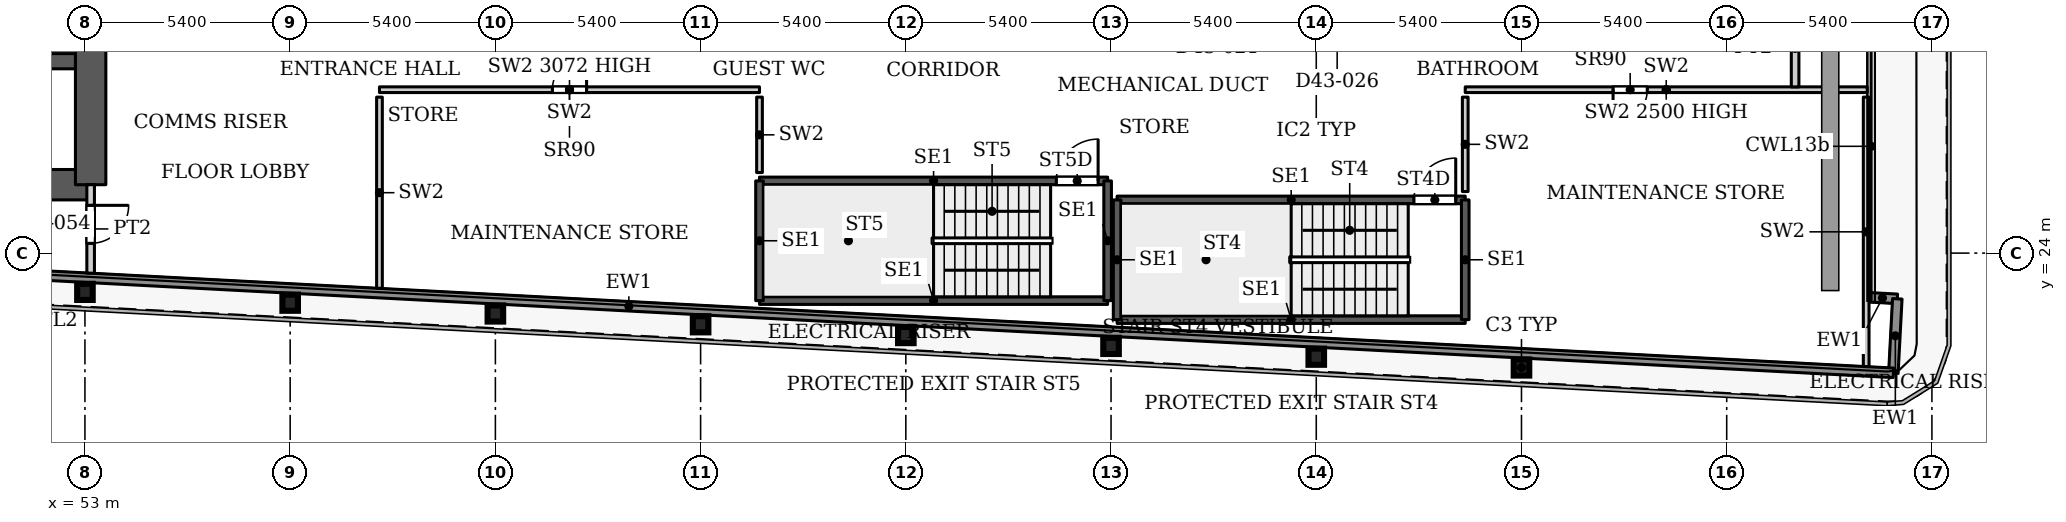
"""IFC4 building model, lengths in metres.
Left out: names, types, materials, properties, quantities, classifications, styles, units other than length and angle.
Written with IfcOpenShell. Run it as: python <this file> out.ifc"""

import sys

from ifc_helpers import new_model, si_unit, direction, frame, frame_2d, origin, origin_2d, place, context, subcontext, project, spatial, rectangle, i_section, extrude, source, transform, mapped, element, fill, save


model = new_model("IFC4")
c1 = context("Model", 3, precision=1e-05, world=origin(), true_north=direction((0.0, 1.0)))
c2 = subcontext(c1, "Body", "Model", "MODEL_VIEW")
j1 = project(units=[si_unit("LENGTHUNIT", "METRE"), si_unit("PLANEANGLEUNIT", "RADIAN")], contexts=[c1])
p1 = place(None, origin())
s1 = spatial("IfcSite", under=j1, at=p1, CompositionType="ELEMENT")
p2 = place(p1, origin())
s2 = spatial("IfcBuilding", under=s1, at=p2, CompositionType="ELEMENT")
p3 = place(p2, frame((0.0, 0.0, 191.6)))
s3 = spatial("IfcBuildingStorey", under=s2, at=p3, CompositionType="ELEMENT", Elevation=191.6)
for number, where, z_axis, x_axis in (
    (1, (90.8, 20.99, 0.0), (0.0, 0.0, 1.0), (1.0, 0.0, 0.0)),
    (2, (85.4, 21.274, 0.0), (0.0, 0.0, 1.0), (1.0, 0.0, 0.0)),
    (3, (80.0, 21.558, 0.0), (0.0, 0.0, 1.0), (1.0, 0.0, 0.0)),
    (4, (74.6, 21.843, 0.0), (0.0, 0.0, 1.0), (1.0, 0.0, 0.0)),
    (5, (69.2, 22.127, 0.0), (0.0, 0.0, 1.0), (1.0, 0.0, 0.0)),
    (6, (63.8, 22.411, 0.0), (0.0, 0.0, 1.0), (1.0, 0.0, 0.0)),
    (7, (58.4, 22.695, 0.0), (0.0, 0.0, 1.0), (1.0, 0.0, 0.0)),
    (8, (53.0, 22.98, 0.0), (0.0, 0.0, 1.0), (1.0, 0.0, 0.0)),
):
    element("IfcColumn", number, at=place(p3, frame(where, z_axis=z_axis, x_axis=x_axis)), inside=s3, PredefinedType="COLUMN", context=c2, shape_type="SweptSolid", body=[
        extrude(i_section(OverallWidth=0.409, OverallDepth=0.425, WebThickness=0.033, FlangeThickness=0.052, FilletRadius=0.013, at=origin_2d()), origin(), (0.0, 0.0, 1.0), 3.9),
    ])
p4 = place(p3, frame((34.75, 25.8, 0.0), z_axis=(0.0, 0.0, 1.0), x_axis=(1.0, 0.0, 0.0)))
e9 = element("IfcWall", 9, at=p4, inside=s3, PredefinedType="SHEAR", context=c2, shape_type="SweptSolid", body=[
    extrude(rectangle(XDim=18.4, YDim=0.8, at=frame_2d((9.2, 0.0))), origin(), (0.0, 0.0, 1.0), 3.9),
])
p5 = place(p3, frame((34.75, 29.05, 0.0), z_axis=(0.0, 0.0, 1.0), x_axis=(1.0, 0.0, 0.0)))
e10 = element("IfcWall", 10, at=p5, inside=s3, PredefinedType="SHEAR", context=c2, shape_type="SweptSolid", body=[
    extrude(rectangle(XDim=18.4, YDim=0.4, at=frame_2d((9.2, 0.0))), origin(), (0.0, 0.0, 1.0), 3.9),
])
p6 = place(p5, frame((0.875, 0.0, 0.0)))
e11 = element("IfcOpeningElement", 11, at=p6, cuts=e10, PredefinedType="OPENING", context=c2, shape_type="SweptSolid", body=[
    extrude(rectangle(XDim=1.1, YDim=2.2, at=frame_2d((0.55, 1.1))), frame((0.0, 0.21, 0.0), z_axis=(0.0, -1.0, 0.0), x_axis=(1.0, 0.0, 0.0)), (0.0, 0.0, 1.0), 0.42),
])
p7 = place(p5, frame((3.725, 0.0, 0.0)))
e12 = element("IfcOpeningElement", 12, at=p7, cuts=e10, PredefinedType="OPENING", context=c2, shape_type="SweptSolid", body=[
    extrude(rectangle(XDim=1.1, YDim=2.2, at=frame_2d((0.55, 1.1))), frame((0.0, 0.21, 0.0), z_axis=(0.0, -1.0, 0.0), x_axis=(1.0, 0.0, 0.0)), (0.0, 0.0, 1.0), 0.42),
])
p8 = place(p5, frame((6.575, 0.0, 0.0)))
e13 = element("IfcOpeningElement", 13, at=p8, cuts=e10, PredefinedType="OPENING", context=c2, shape_type="SweptSolid", body=[
    extrude(rectangle(XDim=1.1, YDim=2.2, at=frame_2d((0.55, 1.1))), frame((0.0, 0.21, 0.0), z_axis=(0.0, -1.0, 0.0), x_axis=(1.0, 0.0, 0.0)), (0.0, 0.0, 1.0), 0.42),
])
p9 = place(p5, frame((9.425, 0.0, 0.0)))
e14 = element("IfcOpeningElement", 14, at=p9, cuts=e10, PredefinedType="OPENING", context=c2, shape_type="SweptSolid", body=[
    extrude(rectangle(XDim=1.1, YDim=2.2, at=frame_2d((0.55, 1.1))), frame((0.0, 0.21, 0.0), z_axis=(0.0, -1.0, 0.0), x_axis=(1.0, 0.0, 0.0)), (0.0, 0.0, 1.0), 0.42),
])
p10 = place(p5, frame((12.275, 0.0, 0.0)))
e15 = element("IfcOpeningElement", 15, at=p10, cuts=e10, PredefinedType="OPENING", context=c2, shape_type="SweptSolid", body=[
    extrude(rectangle(XDim=1.1, YDim=2.2, at=frame_2d((0.55, 1.1))), frame((0.0, 0.21, 0.0), z_axis=(0.0, -1.0, 0.0), x_axis=(1.0, 0.0, 0.0)), (0.0, 0.0, 1.0), 0.42),
])
p11 = place(p5, frame((15.125, 0.0, 0.0)))
e16 = element("IfcOpeningElement", 16, at=p11, cuts=e10, PredefinedType="OPENING", context=c2, shape_type="SweptSolid", body=[
    extrude(rectangle(XDim=1.1, YDim=2.2, at=frame_2d((0.55, 1.1))), frame((0.0, 0.21, 0.0), z_axis=(0.0, -1.0, 0.0), x_axis=(1.0, 0.0, 0.0)), (0.0, 0.0, 1.0), 0.42),
])
p12 = place(p3, frame((53.15, 25.8, 0.0), z_axis=(0.0, 0.0, 1.0), x_axis=(0.0, 1.0, 0.0)))
e17 = element("IfcWall", 17, at=p12, inside=s3, PredefinedType="SHEAR", context=c2, shape_type="SweptSolid", body=[
    extrude(rectangle(XDim=10.4, YDim=0.8, at=frame_2d((5.2, 0.0))), origin(), (0.0, 0.0, 1.0), 3.9),
])
p13 = place(p3, frame((99.907, 22.839, 0.0), z_axis=(0.0, 0.0, 1.0), x_axis=(0.998561284263, -0.053622398031, 0.0)))
e18 = element("IfcWall", 18, at=p13, inside=s3, PredefinedType="SOLIDWALL", context=c2, shape_type="SweptSolid", body=[
    extrude(rectangle(XDim=0.783, YDim=0.25, at=frame_2d((0.392, 0.0))), origin(), (0.0, 0.0, 1.0), 3.75),
])
p14 = place(p3, frame((100.689, 22.797, 0.0), z_axis=(0.0, 0.0, 1.0), x_axis=(-0.052841433274, -0.998602915542, 0.0)))
e19 = element("IfcWall", 19, at=p14, inside=s3, PredefinedType="SOLIDWALL", context=c2, shape_type="SweptSolid", body=[
    extrude(rectangle(XDim=1.95, YDim=0.25, at=frame_2d((0.975, 0.0))), origin(), (0.0, 0.0, 1.0), 3.75),
])
p15 = place(p3, frame((100.586, 20.85, 0.0), z_axis=(0.0, 0.0, 1.0), x_axis=(-0.99861746497, 0.052565755559, 0.0)))
e20 = element("IfcWall", 20, at=p15, inside=s3, PredefinedType="SOLIDWALL", context=c2, shape_type="SweptSolid", body=[
    extrude(rectangle(XDim=66.639, YDim=0.25, at=frame_2d((33.319, 0.0))), origin(), (0.0, 0.0, 1.0), 3.75),
])
p16 = place(p3, frame((80.16, 22.25, 0.0), z_axis=(0.0, 0.0, 1.0), x_axis=(1.0, 0.0, 0.0)))
e21 = element("IfcWall", 21, at=p16, inside=s3, PredefinedType="SHEAR", context=c2, shape_type="SweptSolid", body=[
    extrude(rectangle(XDim=9.16, YDim=0.2, at=frame_2d((4.58, 0.0))), origin(), (0.0, 0.0, 1.0), 3.9),
])
p17 = place(p3, frame((80.16, 25.4, 0.0), z_axis=(0.0, 0.0, 1.0), x_axis=(1.0, 0.0, 0.0)))
e22 = element("IfcWall", 22, at=p17, inside=s3, PredefinedType="SHEAR", context=c2, shape_type="SweptSolid", body=[
    extrude(rectangle(XDim=9.16, YDim=0.2, at=frame_2d((4.58, 0.0))), origin(), (0.0, 0.0, 1.0), 3.9),
])
p18 = place(p17, frame((7.81, 0.0, 0.0)))
e23 = element("IfcOpeningElement", 23, at=p18, cuts=e22, PredefinedType="OPENING", context=c2, shape_type="SweptSolid", body=[
    extrude(rectangle(XDim=1.1, YDim=2.2, at=frame_2d((0.55, 1.1))), frame((0.0, 0.11, 0.0), z_axis=(0.0, -1.0, 0.0), x_axis=(1.0, 0.0, 0.0)), (0.0, 0.0, 1.0), 0.22),
])
for number, where, z_axis, x_axis in (
    (24, (80.16, 22.25, 0.0), (0.0, 0.0, 1.0), (0.0, 1.0, 0.0)),
    (25, (89.32, 22.25, 0.0), (0.0, 0.0, 1.0), (0.0, 1.0, 0.0)),
):
    element("IfcWall", number, at=place(p3, frame(where, z_axis=z_axis, x_axis=x_axis)), inside=s3, PredefinedType="SHEAR", context=c2, shape_type="SweptSolid", body=[
        extrude(rectangle(XDim=3.15, YDim=0.2, at=frame_2d((1.575, 0.0))), origin(), (0.0, 0.0, 1.0), 3.9),
    ])
p19 = place(p3, frame((70.75, 22.75, 0.0), z_axis=(0.0, 0.0, 1.0), x_axis=(1.0, 0.0, 0.0)))
e26 = element("IfcWall", 26, at=p19, inside=s3, PredefinedType="SHEAR", context=c2, shape_type="SweptSolid", body=[
    extrude(rectangle(XDim=9.16, YDim=0.2, at=frame_2d((4.58, 0.0))), origin(), (0.0, 0.0, 1.0), 3.9),
])
p20 = place(p3, frame((70.75, 25.9, 0.0), z_axis=(0.0, 0.0, 1.0), x_axis=(1.0, 0.0, 0.0)))
e27 = element("IfcWall", 27, at=p20, inside=s3, PredefinedType="SHEAR", context=c2, shape_type="SweptSolid", body=[
    extrude(rectangle(XDim=9.16, YDim=0.2, at=frame_2d((4.58, 0.0))), origin(), (0.0, 0.0, 1.0), 3.9),
])
p21 = place(p20, frame((7.81, 0.0, 0.0)))
e28 = element("IfcOpeningElement", 28, at=p21, cuts=e27, PredefinedType="OPENING", context=c2, shape_type="SweptSolid", body=[
    extrude(rectangle(XDim=1.1, YDim=2.2, at=frame_2d((0.55, 1.1))), frame((0.0, 0.11, 0.0), z_axis=(0.0, -1.0, 0.0), x_axis=(1.0, 0.0, 0.0)), (0.0, 0.0, 1.0), 0.22),
])
for number, where, z_axis, x_axis in (
    (29, (70.75, 22.75, 0.0), (0.0, 0.0, 1.0), (0.0, 1.0, 0.0)),
    (30, (79.91, 22.75, 0.0), (0.0, 0.0, 1.0), (0.0, 1.0, 0.0)),
):
    element("IfcWall", number, at=place(p3, frame(where, z_axis=z_axis, x_axis=x_axis)), inside=s3, PredefinedType="SHEAR", context=c2, shape_type="SweptSolid", body=[
        extrude(rectangle(XDim=3.15, YDim=0.2, at=frame_2d((1.575, 0.0))), origin(), (0.0, 0.0, 1.0), 3.9),
    ])
p22 = place(p3, frame((60.75, 28.3, 0.0), z_axis=(0.0, 0.0, 1.0), x_axis=(1.0, 0.0, 0.0)))
e31 = element("IfcWall", 31, at=p22, inside=s3, PredefinedType="PARTITIONING", context=c2, shape_type="SweptSolid", body=[
    extrude(rectangle(XDim=10.0, YDim=0.15, at=frame_2d((5.0, 0.0))), origin(), (0.0, 0.0, 1.0), 3.072),
])
p23 = place(p22, frame((4.55, 0.0, 0.0)))
e32 = element("IfcOpeningElement", 32, at=p23, cuts=e31, PredefinedType="OPENING", context=c2, shape_type="SweptSolid", body=[
    extrude(rectangle(XDim=0.9, YDim=2.2, at=frame_2d((0.45, 1.1))), frame((0.0, 0.085, 0.0), z_axis=(0.0, -1.0, 0.0), x_axis=(1.0, 0.0, 0.0)), (0.0, 0.0, 1.0), 0.17),
])
p24 = place(p3, frame((60.75, 23.075, 0.0), z_axis=(0.0, 0.0, 1.0), x_axis=(0.0, 1.0, 0.0)))
e33 = element("IfcWall", 33, at=p24, inside=s3, PredefinedType="PARTITIONING", context=c2, shape_type="SweptSolid", body=[
    extrude(rectangle(XDim=5.03, YDim=0.15, at=frame_2d((2.515, 0.0))), origin(), (0.0, 0.0, 1.0), 3.9),
])
p25 = place(p3, frame((70.75, 26.12, 0.0), z_axis=(0.0, 0.0, 1.0), x_axis=(0.0, 1.0, 0.0)))
e34 = element("IfcWall", 34, at=p25, inside=s3, PredefinedType="PARTITIONING", context=c2, shape_type="SweptSolid", body=[
    extrude(rectangle(XDim=1.985, YDim=0.15, at=frame_2d((0.992, 0.0))), origin(), (0.0, 0.0, 1.0), 3.9),
])
p26 = place(p3, frame((89.32, 28.3, 0.0), z_axis=(0.0, 0.0, 1.0), x_axis=(1.0, 0.0, 0.0)))
e35 = element("IfcWall", 35, at=p26, inside=s3, PredefinedType="PARTITIONING", context=c2, shape_type="SweptSolid", body=[
    extrude(rectangle(XDim=10.578, YDim=0.15, at=frame_2d((5.289, 0.0))), origin(), (0.0, 0.0, 1.0), 2.5),
])
p27 = place(p26, frame((3.89, 0.0, 0.0)))
e36 = element("IfcOpeningElement", 36, at=p27, cuts=e35, PredefinedType="OPENING", context=c2, shape_type="SweptSolid", body=[
    extrude(rectangle(XDim=0.9, YDim=2.2, at=frame_2d((0.45, 1.1))), frame((0.0, 0.085, 0.0), z_axis=(0.0, -1.0, 0.0), x_axis=(1.0, 0.0, 0.0)), (0.0, 0.0, 1.0), 0.17),
])
p28 = place(p3, frame((89.32, 25.62, 0.0), z_axis=(0.0, 0.0, 1.0), x_axis=(0.0, 1.0, 0.0)))
e37 = element("IfcWall", 37, at=p28, inside=s3, PredefinedType="PARTITIONING", context=c2, shape_type="SweptSolid", body=[
    extrude(rectangle(XDim=2.485, YDim=0.15, at=frame_2d((1.242, 0.0))), origin(), (0.0, 0.0, 1.0), 3.9),
])
p29 = place(p3, frame((99.87, 21.015, 0.0), z_axis=(0.0, 0.0, 1.0), x_axis=(0.0, 1.0, 0.0)))
e38 = element("IfcWall", 38, at=p29, inside=s3, PredefinedType="PARTITIONING", context=c2, shape_type="SweptSolid", body=[
    extrude(rectangle(XDim=7.09, YDim=0.15, at=frame_2d((3.545, 0.0))), origin(), (0.0, 0.0, 1.0), 3.9),
])
p30 = place(p3, frame((53.15, 23.472, 0.0), z_axis=(0.0, 0.0, 1.0), x_axis=(0.0, 1.0, 0.0)))
e39 = element("IfcWall", 39, at=p30, inside=s3, PredefinedType="PARTITIONING", context=c2, shape_type="SweptSolid", body=[
    extrude(rectangle(XDim=2.328, YDim=0.2, at=frame_2d((1.164, 0.0))), origin(), (0.0, 0.0, 1.0), 3.6),
])
p31 = place(p30, frame((0.785, 0.0, 0.0)))
e40 = element("IfcOpeningElement", 40, at=p31, cuts=e39, PredefinedType="OPENING", context=c2, shape_type="SweptSolid", body=[
    extrude(rectangle(XDim=1.0, YDim=2.1, at=frame_2d((0.5, 1.05))), frame((0.0, 0.11, 0.0), z_axis=(0.0, -1.0, 0.0), x_axis=(1.0, 0.0, 0.0)), (0.0, 0.0, 1.0), 0.22),
])
p32 = place(p3, frame((98.0, 28.374, 0.0), z_axis=(0.0, 0.0, 1.0), x_axis=(0.0, 1.0, 0.0)))
e41 = element("IfcWall", 41, at=p32, inside=s3, PredefinedType="PARTITIONING", context=c2, shape_type="SweptSolid", body=[
    extrude(rectangle(XDim=2.026, YDim=0.2, at=frame_2d((1.013, 0.0))), origin(), (0.0, 0.0, 1.0), 3.6),
])
m1 = source(origin(), c2, "Body", "SweptSolid", [
    extrude(rectangle(XDim=0.9, YDim=2.2, at=frame_2d((0.45, 1.1))), frame((0.0, 0.025, 0.0), z_axis=(0.0, -1.0, 0.0), x_axis=(1.0, 0.0, 0.0)), (0.0, 0.0, 1.0), 0.05),
])
p33 = place(p23, origin())
e42 = element("IfcDoor", 42, at=p33, inside=s3, OperationType="SINGLE_SWING_LEFT", PredefinedType="DOOR", context=c2, shape_type="MappedRepresentation", body=[
    mapped(m1, transform((0.0, 0.0, 0.0), x_axis=(1.0, 0.0, 0.0), y_axis=(0.0, 1.0, 0.0), z_axis=(0.0, 0.0, 1.0), scale=1.0)),
])
fill(e32, e42)
p34 = place(p27, origin())
e43 = element("IfcDoor", 43, at=p34, inside=s3, OperationType="SINGLE_SWING_RIGHT", PredefinedType="DOOR", context=c2, shape_type="MappedRepresentation", body=[
    mapped(m1, transform((0.0, 0.0, 0.0), x_axis=(1.0, 0.0, 0.0), y_axis=(0.0, 1.0, 0.0), z_axis=(0.0, 0.0, 1.0), scale=1.0)),
])
fill(e36, e43)
m2 = source(origin(), c2, "Body", "SweptSolid", [
    extrude(rectangle(XDim=1.1, YDim=2.2, at=frame_2d((0.55, 1.1))), frame((0.0, 0.025, 0.0), z_axis=(0.0, -1.0, 0.0), x_axis=(1.0, 0.0, 0.0)), (0.0, 0.0, 1.0), 0.05),
])
p35 = place(p18, origin())
e44 = element("IfcDoor", 44, at=p35, inside=s3, OperationType="SINGLE_SWING_LEFT", PredefinedType="DOOR", context=c2, shape_type="MappedRepresentation", body=[
    mapped(m2, transform((0.0, 0.0, 0.0), x_axis=(1.0, 0.0, 0.0), y_axis=(0.0, 1.0, 0.0), z_axis=(0.0, 0.0, 1.0), scale=1.0)),
])
fill(e23, e44)
p36 = place(p21, origin())
e45 = element("IfcDoor", 45, at=p36, inside=s3, OperationType="SINGLE_SWING_LEFT", PredefinedType="DOOR", context=c2, shape_type="MappedRepresentation", body=[
    mapped(m2, transform((0.0, 0.0, 0.0), x_axis=(1.0, 0.0, 0.0), y_axis=(0.0, 1.0, 0.0), z_axis=(0.0, 0.0, 1.0), scale=1.0)),
])
fill(e28, e45)
m3 = source(origin(), c2, "Body", "SweptSolid", [
    extrude(rectangle(XDim=1.0, YDim=2.1, at=frame_2d((0.5, 1.05))), frame((0.0, 0.025, 0.0), z_axis=(0.0, -1.0, 0.0), x_axis=(1.0, 0.0, 0.0)), (0.0, 0.0, 1.0), 0.05),
])
p37 = place(p31, origin())
e46 = element("IfcDoor", 46, at=p37, inside=s3, OperationType="SINGLE_SWING_RIGHT", PredefinedType="DOOR", context=c2, shape_type="MappedRepresentation", body=[
    mapped(m3, transform((0.0, 0.0, 0.0), x_axis=(1.0, 0.0, 0.0), y_axis=(0.0, 1.0, 0.0), z_axis=(0.0, 0.0, 1.0), scale=1.0)),
])
fill(e40, e46)
save(model, sys.argv[1])
